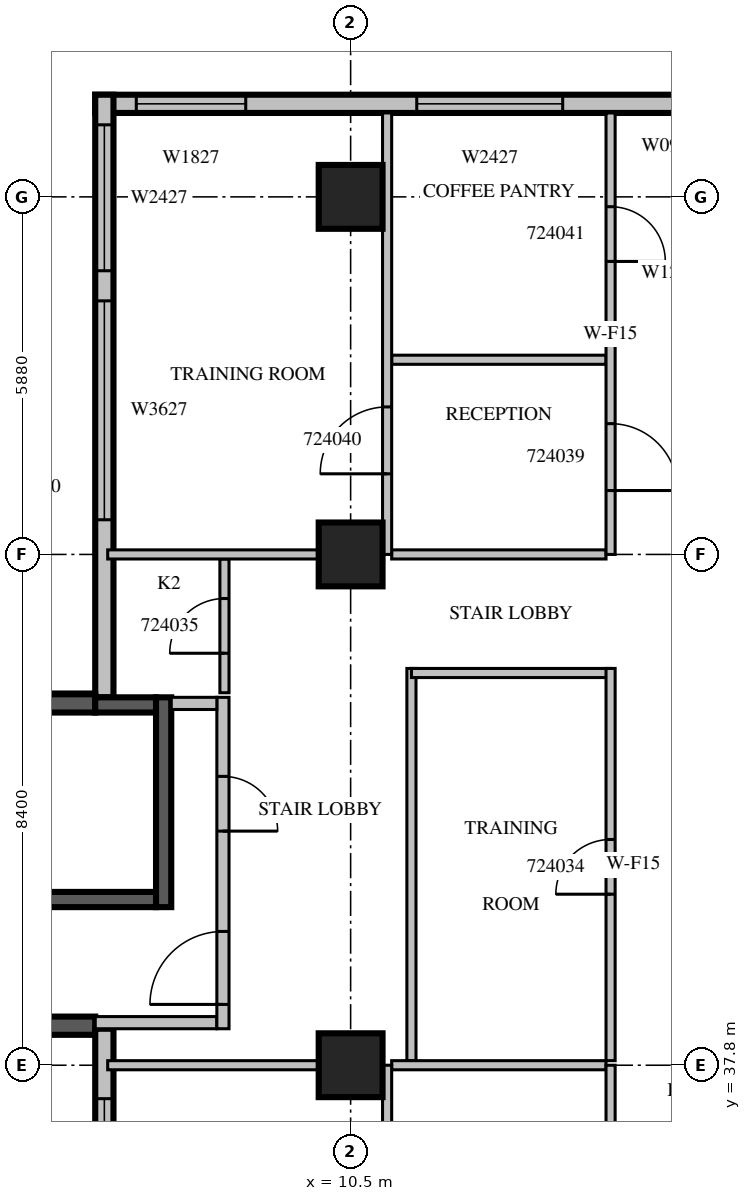
"""IFC4 building model, lengths in metres.
Left out: names, types, materials, properties, quantities, classifications, styles, units other than length and angle.
Written with IfcOpenShell. Run it as: python <this file> out.ifc"""

import sys

from ifc_helpers import new_model, si_unit, direction, frame, frame_2d, origin, origin_2d, place, context, subcontext, project, spatial, rectangle, extrude, source, transform, mapped, element, fill, save


model = new_model("IFC4")
c1 = context("Model", 3, precision=1e-05, world=origin(), true_north=direction((0.0, 1.0)))
c2 = subcontext(c1, "Body", "Model", "MODEL_VIEW")
j1 = project(units=[si_unit("LENGTHUNIT", "METRE"), si_unit("PLANEANGLEUNIT", "RADIAN")], contexts=[c1])
p1 = place(None, origin())
s1 = spatial("IfcSite", under=j1, at=p1, CompositionType="ELEMENT")
p2 = place(p1, origin())
s2 = spatial("IfcBuilding", under=s1, at=p2, CompositionType="ELEMENT")
p3 = place(p2, frame((0.0, 0.0, 111.9)))
s3 = spatial("IfcBuildingStorey", under=s2, at=p3, CompositionType="ELEMENT", Elevation=111.9)
m1 = source(origin(), c2, "Body", "SweptSolid", [
    extrude(rectangle(XDim=1.05, YDim=1.05, at=origin_2d()), origin(), (0.0, 0.0, 1.0), 4.2),
])
for number, where, z_axis, x_axis in (
    (1, (10.5, 37.8, 0.0), (0.0, 0.0, 1.0), (1.0, 0.0, 0.0)),
    (2, (10.5, 46.2, 0.0), (0.0, 0.0, 1.0), (1.0, 0.0, 0.0)),
    (3, (10.5, 52.08, 0.0), (0.0, 0.0, 1.0), (1.0, 0.0, 0.0)),
):
    element("IfcColumn", number, at=place(p3, frame(where, z_axis=z_axis, x_axis=x_axis)), inside=s3, PredefinedType="COLUMN", context=c2, shape_type="MappedRepresentation", body=[
        mapped(m1, transform((0.0, 0.0, 0.0), scale=1.0)),
    ])
m2 = source(origin(), c2, "Body", "SweptSolid", [
    extrude(rectangle(XDim=10.5, YDim=0.3, at=frame_2d((5.25, 0.0))), origin(), (0.0, 0.0, 1.0), 3.8),
])
p4 = place(p3, frame((16.8, 53.61, 0.0), z_axis=(0.0, 0.0, 1.0), x_axis=(-1.0, 0.0, 0.0)))
e4 = element("IfcWall", 4, at=p4, inside=s3, PredefinedType="STANDARD", context=c2, shape_type="MappedRepresentation", body=[
    mapped(m2, transform((0.0, 0.0, 0.0), scale=1.0)),
])
m3 = source(origin(), c2, "Body", "SweptSolid", [
    extrude(rectangle(XDim=1.8, YDim=2.7, at=frame_2d((0.9, 1.35))), frame((0.0, 0.16, 0.0), z_axis=(0.0, -1.0, 0.0), x_axis=(1.0, 0.0, 0.0)), (0.0, 0.0, 1.0), 0.32),
])
p5 = place(p4, frame((8.025, 0.0, 0.6)))
e5 = element("IfcOpeningElement", 5, at=p5, cuts=e4, PredefinedType="OPENING", context=c2, shape_type="MappedRepresentation", body=[
    mapped(m3, transform((0.0, 0.0, 0.0), scale=1.0)),
])
m4 = source(origin(), c2, "Body", "SweptSolid", [
    extrude(rectangle(XDim=2.4, YDim=2.7, at=frame_2d((1.2, 1.35))), frame((0.0, 0.16, 0.0), z_axis=(0.0, -1.0, 0.0), x_axis=(1.0, 0.0, 0.0)), (0.0, 0.0, 1.0), 0.32),
])
p6 = place(p4, frame((2.812, 0.0, 0.6)))
e6 = element("IfcOpeningElement", 6, at=p6, cuts=e4, PredefinedType="OPENING", context=c2, shape_type="MappedRepresentation", body=[
    mapped(m4, transform((0.0, 0.0, 0.0), scale=1.0)),
])
m5 = source(origin(), c2, "Body", "SweptSolid", [
    extrude(rectangle(XDim=9.91, YDim=0.3, at=frame_2d((4.955, 0.0))), origin(), (0.0, 0.0, 1.0), 3.8),
])
p7 = place(p3, frame((6.45, 53.76, 0.0), z_axis=(0.0, 0.0, 1.0), x_axis=(0.0, -1.0, 0.0)))
e7 = element("IfcWall", 7, at=p7, inside=s3, PredefinedType="STANDARD", context=c2, shape_type="MappedRepresentation", body=[
    mapped(m5, transform((0.0, 0.0, 0.0), scale=1.0)),
])
m6 = source(origin(), c2, "Body", "SweptSolid", [
    extrude(rectangle(XDim=3.6, YDim=2.7, at=frame_2d((1.8, 1.35))), frame((0.0, 0.16, 0.0), z_axis=(0.0, -1.0, 0.0), x_axis=(1.0, 0.0, 0.0)), (0.0, 0.0, 1.0), 0.32),
])
p8 = place(p7, frame((3.39, 0.0, 0.6)))
e8 = element("IfcOpeningElement", 8, at=p8, cuts=e7, PredefinedType="OPENING", context=c2, shape_type="MappedRepresentation", body=[
    mapped(m6, transform((0.0, 0.0, 0.0), scale=1.0)),
])
p9 = place(p7, frame((0.495, 0.0, 0.6)))
e9 = element("IfcOpeningElement", 9, at=p9, cuts=e7, PredefinedType="OPENING", context=c2, shape_type="MappedRepresentation", body=[
    mapped(m4, transform((0.0, 0.0, 0.0), scale=1.0)),
])
m7 = source(origin(), c2, "Body", "SweptSolid", [
    extrude(rectangle(XDim=6.1, YDim=0.3, at=frame_2d((3.05, 0.0))), origin(), (0.0, 0.0, 1.0), 3.8),
])
for number, where, z_axis, x_axis in (
    (10, (6.3, 43.75, 0.0), (0.0, 0.0, 1.0), (-1.0, 0.0, 0.0)),
    (11, (0.2, 38.45, 0.0), (0.0, 0.0, 1.0), (1.0, 0.0, 0.0)),
):
    element("IfcWall", number, at=place(p3, frame(where, z_axis=z_axis, x_axis=x_axis)), inside=s3, PredefinedType="SOLIDWALL", context=c2, shape_type="MappedRepresentation", body=[
        mapped(m7, transform((0.0, 0.0, 0.0), scale=1.0)),
    ])
m8 = source(origin(), c2, "Body", "SweptSolid", [
    extrude(rectangle(XDim=16.4, YDim=0.3, at=frame_2d((8.2, 0.0))), origin(), (0.0, 0.0, 1.0), 3.8),
])
p10 = place(p3, frame((6.45, 38.4, 0.0), z_axis=(0.0, 0.0, 1.0), x_axis=(0.0, -1.0, 0.0)))
e12 = element("IfcWall", 12, at=p10, inside=s3, PredefinedType="STANDARD", context=c2, shape_type="MappedRepresentation", body=[
    mapped(m8, transform((0.0, 0.0, 0.0), scale=1.0)),
])
p11 = place(p10, frame((1.15, 0.0, 0.6)))
e13 = element("IfcOpeningElement", 13, at=p11, cuts=e12, PredefinedType="OPENING", context=c2, shape_type="MappedRepresentation", body=[
    mapped(m3, transform((0.0, 0.0, 0.0), scale=1.0)),
])
p12 = place(p10, frame((9.438, 0.0, 0.6)))
e14 = element("IfcOpeningElement", 14, at=p12, cuts=e12, PredefinedType="OPENING", context=c2, shape_type="MappedRepresentation", body=[
    mapped(m3, transform((0.0, 0.0, 0.0), scale=1.0)),
])
p13 = place(p10, frame((13.537, 0.0, 0.6)))
e15 = element("IfcOpeningElement", 15, at=p13, cuts=e12, PredefinedType="OPENING", context=c2, shape_type="MappedRepresentation", body=[
    mapped(m3, transform((0.0, 0.0, 0.0), scale=1.0)),
])
m9 = source(origin(), c2, "Body", "SweptSolid", [
    extrude(rectangle(XDim=1.0, YDim=2.1, at=frame_2d((0.5, 1.05))), frame((0.0, 0.16, 0.0), z_axis=(0.0, -1.0, 0.0), x_axis=(1.0, 0.0, 0.0)), (0.0, 0.0, 1.0), 0.32),
])
p14 = place(p10, frame((5.908, 0.0, 0.0)))
e16 = element("IfcOpeningElement", 16, at=p14, cuts=e12, PredefinedType="OPENING", context=c2, shape_type="MappedRepresentation", body=[
    mapped(m9, transform((0.0, 0.0, 0.0), scale=1.0)),
])
m10 = source(origin(), c2, "Body", "SweptSolid", [
    extrude(rectangle(XDim=7.0, YDim=0.25, at=frame_2d((3.5, 0.0))), origin(), (0.0, 0.0, 1.0), 3.8),
])
p15 = place(p3, frame((0.3, 40.525, 0.0), z_axis=(0.0, 0.0, 1.0), x_axis=(1.0, 0.0, 0.0)))
e17 = element("IfcWall", 17, at=p15, inside=s3, PredefinedType="SOLIDWALL", context=c2, shape_type="MappedRepresentation", body=[
    mapped(m10, transform((0.0, 0.0, 0.0), scale=1.0)),
])
m11 = source(origin(), c2, "Body", "SweptSolid", [
    extrude(rectangle(XDim=1.1, YDim=2.1, at=frame_2d((0.55, 1.05))), frame((0.0, 0.135, 0.0), z_axis=(0.0, -1.0, 0.0), x_axis=(1.0, 0.0, 0.0)), (0.0, 0.0, 1.0), 0.27),
])
p16 = place(p15, frame((0.55, 0.0, 0.0)))
e18 = element("IfcOpeningElement", 18, at=p16, cuts=e17, PredefinedType="OPENING", context=c2, shape_type="MappedRepresentation", body=[
    mapped(m11, transform((0.0, 0.0, 0.0), scale=1.0)),
])
m12 = source(origin(), c2, "Body", "SweptSolid", [
    extrude(rectangle(XDim=1.0, YDim=0.25, at=frame_2d((0.5, 0.0))), origin(), (0.0, 0.0, 1.0), 3.8),
])
p17 = place(p3, frame((6.3, 43.725, 0.0), z_axis=(0.0, 0.0, 1.0), x_axis=(1.0, 0.0, 0.0)))
e19 = element("IfcWall", 19, at=p17, inside=s3, PredefinedType="SOLIDWALL", context=c2, shape_type="MappedRepresentation", body=[
    mapped(m12, transform((0.0, 0.0, 0.0), scale=1.0)),
])
m13 = source(origin(), c2, "Body", "SweptSolid", [
    extrude(rectangle(XDim=3.45, YDim=0.25, at=frame_2d((1.725, 0.0))), origin(), (0.0, 0.0, 1.0), 3.8),
])
p18 = place(p3, frame((7.425, 40.4, 0.0), z_axis=(0.0, 0.0, 1.0), x_axis=(0.0, 1.0, 0.0)))
e20 = element("IfcWall", 20, at=p18, inside=s3, PredefinedType="SOLIDWALL", context=c2, shape_type="MappedRepresentation", body=[
    mapped(m13, transform((0.0, 0.0, 0.0), scale=1.0)),
])
m14 = source(origin(), c2, "Body", "SweptSolid", [
    extrude(rectangle(XDim=2.0, YDim=0.2, at=frame_2d((1.0, 0.0))), origin(), (0.0, 0.0, 1.0), 3.8),
])
p19 = place(p3, frame((6.3, 38.5, 0.0), z_axis=(0.0, 0.0, 1.0), x_axis=(1.0, 0.0, 0.0)))
e21 = element("IfcWall", 21, at=p19, inside=s3, PredefinedType="PARTITIONING", context=c2, shape_type="MappedRepresentation", body=[
    mapped(m14, transform((0.0, 0.0, 0.0), scale=1.0)),
])
m15 = source(origin(), c2, "Body", "SweptSolid", [
    extrude(rectangle(XDim=5.45, YDim=0.2, at=frame_2d((2.725, 0.0))), origin(), (0.0, 0.0, 1.0), 3.8),
])
p20 = place(p3, frame((8.4, 38.4, 0.0), z_axis=(0.0, 0.0, 1.0), x_axis=(0.0, 1.0, 0.0)))
e22 = element("IfcWall", 22, at=p20, inside=s3, PredefinedType="PARTITIONING", context=c2, shape_type="MappedRepresentation", body=[
    mapped(m15, transform((0.0, 0.0, 0.0), scale=1.0)),
])
m16 = source(origin(), c2, "Body", "SweptSolid", [
    extrude(rectangle(XDim=1.2, YDim=2.1, at=frame_2d((0.6, 1.05))), frame((0.0, 0.11, 0.0), z_axis=(0.0, -1.0, 0.0), x_axis=(1.0, 0.0, 0.0)), (0.0, 0.0, 1.0), 0.22),
])
p21 = place(p20, frame((0.4, 0.0, 0.0)))
e23 = element("IfcOpeningElement", 23, at=p21, cuts=e22, PredefinedType="OPENING", context=c2, shape_type="MappedRepresentation", body=[
    mapped(m16, transform((0.0, 0.0, 0.0), scale=1.0)),
])
m17 = source(origin(), c2, "Body", "SweptSolid", [
    extrude(rectangle(XDim=0.9, YDim=2.1, at=frame_2d((0.45, 1.05))), frame((0.0, 0.11, 0.0), z_axis=(0.0, -1.0, 0.0), x_axis=(1.0, 0.0, 0.0)), (0.0, 0.0, 1.0), 0.22),
])
p22 = place(p20, frame((3.25, 0.0, 0.0)))
e24 = element("IfcOpeningElement", 24, at=p22, cuts=e22, PredefinedType="OPENING", context=c2, shape_type="MappedRepresentation", body=[
    mapped(m17, transform((0.0, 0.0, 0.0), scale=1.0)),
])
m18 = source(origin(), c2, "Body", "SweptSolid", [
    extrude(rectangle(XDim=0.75, YDim=0.2, at=frame_2d((0.375, 0.0))), origin(), (0.0, 0.0, 1.0), 3.8),
])
p23 = place(p3, frame((7.55, 43.75, 0.0), z_axis=(0.0, 0.0, 1.0), x_axis=(1.0, 0.0, 0.0)))
e25 = element("IfcWall", 25, at=p23, inside=s3, PredefinedType="PARTITIONING", context=c2, shape_type="MappedRepresentation", body=[
    mapped(m18, transform((0.0, 0.0, 0.0), scale=1.0)),
])
m19 = source(origin(), c2, "Body", "SweptSolid", [
    extrude(rectangle(XDim=6.45, YDim=0.15, at=frame_2d((3.225, 0.0))), origin(), (0.0, 0.0, 1.0), 3.8),
])
p24 = place(p3, frame((11.5, 44.325, 0.0), z_axis=(0.0, 0.0, 1.0), x_axis=(0.0, -1.0, 0.0)))
e26 = element("IfcWall", 26, at=p24, inside=s3, PredefinedType="PARTITIONING", context=c2, shape_type="MappedRepresentation", body=[
    mapped(m19, transform((0.0, 0.0, 0.0), scale=1.0)),
])
m20 = source(origin(), c2, "Body", "SweptSolid", [
    extrude(rectangle(XDim=3.275, YDim=0.15, at=frame_2d((1.637, 0.0))), origin(), (0.0, 0.0, 1.0), 3.8),
])
p25 = place(p3, frame((14.775, 44.25, 0.0), z_axis=(0.0, 0.0, 1.0), x_axis=(-1.0, 0.0, 0.0)))
e27 = element("IfcWall", 27, at=p25, inside=s3, PredefinedType="PARTITIONING", context=c2, shape_type="MappedRepresentation", body=[
    mapped(m20, transform((0.0, 0.0, 0.0), scale=1.0)),
])
p26 = place(p3, frame((14.775, 37.875, 0.0), z_axis=(0.0, 0.0, 1.0), x_axis=(0.0, 1.0, 0.0)))
e28 = element("IfcWall", 28, at=p26, inside=s3, PredefinedType="PARTITIONING", context=c2, shape_type="MappedRepresentation", body=[
    mapped(m19, transform((0.0, 0.0, 0.0), scale=1.0)),
])
m21 = source(origin(), c2, "Body", "SweptSolid", [
    extrude(rectangle(XDim=0.9, YDim=2.1, at=frame_2d((0.45, 1.05))), frame((0.0, 0.085, 0.0), z_axis=(0.0, -1.0, 0.0), x_axis=(1.0, 0.0, 0.0)), (0.0, 0.0, 1.0), 0.17),
])
p27 = place(p26, frame((2.737, 0.0, 0.0)))
e29 = element("IfcOpeningElement", 29, at=p27, cuts=e28, PredefinedType="OPENING", context=c2, shape_type="MappedRepresentation", body=[
    mapped(m21, transform((0.0, 0.0, 0.0), scale=1.0)),
])
m22 = source(origin(), c2, "Body", "SweptSolid", [
    extrude(rectangle(XDim=2.2, YDim=0.15, at=frame_2d((1.1, 0.0))), origin(), (0.0, 0.0, 1.0), 3.8),
])
p28 = place(p3, frame((8.425, 43.925, 0.0), z_axis=(0.0, 0.0, 1.0), x_axis=(0.0, 1.0, 0.0)))
e30 = element("IfcWall", 30, at=p28, inside=s3, PredefinedType="PARTITIONING", context=c2, shape_type="MappedRepresentation", body=[
    mapped(m22, transform((0.0, 0.0, 0.0), scale=1.0)),
])
p29 = place(p28, frame((0.65, 0.0, 0.0)))
e31 = element("IfcOpeningElement", 31, at=p29, cuts=e30, PredefinedType="OPENING", context=c2, shape_type="MappedRepresentation", body=[
    mapped(m21, transform((0.0, 0.0, 0.0), scale=1.0)),
])
m23 = source(origin(), c2, "Body", "SweptSolid", [
    extrude(rectangle(XDim=3.471, YDim=0.15, at=frame_2d((1.736, 0.0))), origin(), (0.0, 0.0, 1.0), 3.8),
])
p30 = place(p3, frame((9.976, 37.8, 0.0), z_axis=(0.0, 0.0, 1.0), x_axis=(-1.0, 0.0, 0.0)))
e32 = element("IfcWall", 32, at=p30, inside=s3, PredefinedType="PARTITIONING", context=c2, shape_type="MappedRepresentation", body=[
    mapped(m23, transform((0.0, 0.0, 0.0), scale=1.0)),
])
m24 = source(origin(), c2, "Body", "SweptSolid", [
    extrude(rectangle(XDim=3.525, YDim=0.15, at=frame_2d((1.762, 0.0))), origin(), (0.0, 0.0, 1.0), 3.8),
])
p31 = place(p3, frame((14.7, 37.8, 0.0), z_axis=(0.0, 0.0, 1.0), x_axis=(-1.0, 0.0, 0.0)))
e33 = element("IfcWall", 33, at=p31, inside=s3, PredefinedType="PARTITIONING", context=c2, shape_type="MappedRepresentation", body=[
    mapped(m24, transform((0.0, 0.0, 0.0), scale=1.0)),
])
m25 = source(origin(), c2, "Body", "SweptSolid", [
    extrude(rectangle(XDim=8.4, YDim=0.15, at=frame_2d((4.2, 0.0))), origin(), (0.0, 0.0, 1.0), 3.8),
])
p32 = place(p3, frame((11.1, 29.4, 0.0), z_axis=(0.0, 0.0, 1.0), x_axis=(0.0, 1.0, 0.0)))
e34 = element("IfcWall", 34, at=p32, inside=s3, PredefinedType="PARTITIONING", context=c2, shape_type="MappedRepresentation", body=[
    mapped(m25, transform((0.0, 0.0, 0.0), scale=1.0)),
])
p33 = place(p32, frame((1.925, 0.0, 0.0)))
e35 = element("IfcOpeningElement", 35, at=p33, cuts=e34, PredefinedType="OPENING", context=c2, shape_type="MappedRepresentation", body=[
    mapped(m21, transform((0.0, 0.0, 0.0), scale=1.0)),
])
p34 = place(p32, frame((5.625, 0.0, 0.0)))
e36 = element("IfcOpeningElement", 36, at=p34, cuts=e34, PredefinedType="OPENING", context=c2, shape_type="MappedRepresentation", body=[
    mapped(m21, transform((0.0, 0.0, 0.0), scale=1.0)),
])
p35 = place(p3, frame((14.7, 49.401, 0.0), z_axis=(0.0, 0.0, 1.0), x_axis=(-1.0, 0.0, 0.0)))
e37 = element("IfcWall", 37, at=p35, inside=s3, PredefinedType="PARTITIONING", context=c2, shape_type="MappedRepresentation", body=[
    mapped(m24, transform((0.0, 0.0, 0.0), scale=1.0)),
])
p36 = place(p3, frame((9.976, 46.2, 0.0), z_axis=(0.0, 0.0, 1.0), x_axis=(-1.0, 0.0, 0.0)))
e38 = element("IfcWall", 38, at=p36, inside=s3, PredefinedType="PARTITIONING", context=c2, shape_type="MappedRepresentation", body=[
    mapped(m23, transform((0.0, 0.0, 0.0), scale=1.0)),
])
p37 = place(p3, frame((14.7, 46.2, 0.0), z_axis=(0.0, 0.0, 1.0), x_axis=(-1.0, 0.0, 0.0)))
e39 = element("IfcWall", 39, at=p37, inside=s3, PredefinedType="PARTITIONING", context=c2, shape_type="MappedRepresentation", body=[
    mapped(m24, transform((0.0, 0.0, 0.0), scale=1.0)),
])
m26 = source(origin(), c2, "Body", "SweptSolid", [
    extrude(rectangle(XDim=7.26, YDim=0.15, at=frame_2d((3.63, 0.0))), origin(), (0.0, 0.0, 1.0), 3.8),
])
p38 = place(p3, frame((11.1, 46.2, 0.0), z_axis=(0.0, 0.0, 1.0), x_axis=(0.0, 1.0, 0.0)))
e40 = element("IfcWall", 40, at=p38, inside=s3, PredefinedType="PARTITIONING", context=c2, shape_type="MappedRepresentation", body=[
    mapped(m26, transform((0.0, 0.0, 0.0), scale=1.0)),
])
m27 = source(origin(), c2, "Body", "SweptSolid", [
    extrude(rectangle(XDim=1.1, YDim=2.1, at=frame_2d((0.55, 1.05))), frame((0.0, 0.085, 0.0), z_axis=(0.0, -1.0, 0.0), x_axis=(1.0, 0.0, 0.0)), (0.0, 0.0, 1.0), 0.17),
])
p39 = place(p38, frame((1.326, 0.0, 0.0)))
e41 = element("IfcOpeningElement", 41, at=p39, cuts=e40, PredefinedType="OPENING", context=c2, shape_type="MappedRepresentation", body=[
    mapped(m27, transform((0.0, 0.0, 0.0), scale=1.0)),
])
p40 = place(p3, frame((14.775, 29.4, 0.0), z_axis=(0.0, 0.0, 1.0), x_axis=(0.0, 1.0, 0.0)))
e42 = element("IfcWall", 42, at=p40, inside=s3, PredefinedType="PARTITIONING", context=c2, shape_type="MappedRepresentation", body=[
    mapped(m25, transform((0.0, 0.0, 0.0), scale=1.0)),
])
m28 = source(origin(), c2, "Body", "SweptSolid", [
    extrude(rectangle(XDim=1.2, YDim=2.1, at=frame_2d((0.6, 1.05))), frame((0.0, 0.085, 0.0), z_axis=(0.0, -1.0, 0.0), x_axis=(1.0, 0.0, 0.0)), (0.0, 0.0, 1.0), 0.17),
])
p41 = place(p40, frame((3.6, 0.0, 0.0)))
e43 = element("IfcOpeningElement", 43, at=p41, cuts=e42, PredefinedType="OPENING", context=c2, shape_type="MappedRepresentation", body=[
    mapped(m28, transform((0.0, 0.0, 0.0), scale=1.0)),
])
p42 = place(p3, frame((14.775, 46.2, 0.0), z_axis=(0.0, 0.0, 1.0), x_axis=(0.0, 1.0, 0.0)))
e44 = element("IfcWall", 44, at=p42, inside=s3, PredefinedType="PARTITIONING", context=c2, shape_type="MappedRepresentation", body=[
    mapped(m26, transform((0.0, 0.0, 0.0), scale=1.0)),
])
p43 = place(p42, frame((1.051, 0.0, 0.0)))
e45 = element("IfcOpeningElement", 45, at=p43, cuts=e44, PredefinedType="OPENING", context=c2, shape_type="MappedRepresentation", body=[
    mapped(m27, transform((0.0, 0.0, 0.0), scale=1.0)),
])
p44 = place(p42, frame((4.818, 0.0, 0.0)))
e46 = element("IfcOpeningElement", 46, at=p44, cuts=e44, PredefinedType="OPENING", context=c2, shape_type="MappedRepresentation", body=[
    mapped(m21, transform((0.0, 0.0, 0.0), scale=1.0)),
])
m29 = source(origin(), c2, "Body", "SweptSolid", [
    extrude(rectangle(XDim=1.8, YDim=2.7, at=frame_2d((0.9, 1.35))), frame((0.0, 0.03, 0.0), z_axis=(0.0, -1.0, 0.0), x_axis=(1.0, 0.0, 0.0)), (0.0, 0.0, 1.0), 0.06),
])
p45 = place(p5, origin())
e47 = element("IfcWindow", 47, at=p45, inside=s3, PartitioningType="SINGLE_PANEL", PredefinedType="WINDOW", context=c2, shape_type="MappedRepresentation", body=[
    mapped(m29, transform((0.0, 0.0, 0.0), scale=1.0)),
])
fill(e5, e47)
m30 = source(origin(), c2, "Body", "SweptSolid", [
    extrude(rectangle(XDim=2.4, YDim=2.7, at=frame_2d((1.2, 1.35))), frame((0.0, 0.03, 0.0), z_axis=(0.0, -1.0, 0.0), x_axis=(1.0, 0.0, 0.0)), (0.0, 0.0, 1.0), 0.06),
])
p46 = place(p6, origin())
e48 = element("IfcWindow", 48, at=p46, inside=s3, PartitioningType="SINGLE_PANEL", PredefinedType="WINDOW", context=c2, shape_type="MappedRepresentation", body=[
    mapped(m30, transform((0.0, 0.0, 0.0), scale=1.0)),
])
fill(e6, e48)
m31 = source(origin(), c2, "Body", "SweptSolid", [
    extrude(rectangle(XDim=3.6, YDim=2.7, at=frame_2d((1.8, 1.35))), frame((0.0, 0.03, 0.0), z_axis=(0.0, -1.0, 0.0), x_axis=(1.0, 0.0, 0.0)), (0.0, 0.0, 1.0), 0.06),
])
p47 = place(p8, origin())
e49 = element("IfcWindow", 49, at=p47, inside=s3, PartitioningType="SINGLE_PANEL", PredefinedType="WINDOW", context=c2, shape_type="MappedRepresentation", body=[
    mapped(m31, transform((0.0, 0.0, 0.0), scale=1.0)),
])
fill(e8, e49)
p48 = place(p9, origin())
e50 = element("IfcWindow", 50, at=p48, inside=s3, PartitioningType="SINGLE_PANEL", PredefinedType="WINDOW", context=c2, shape_type="MappedRepresentation", body=[
    mapped(m30, transform((0.0, 0.0, 0.0), scale=1.0)),
])
fill(e9, e50)
p49 = place(p11, origin())
e51 = element("IfcWindow", 51, at=p49, inside=s3, PartitioningType="SINGLE_PANEL", PredefinedType="WINDOW", context=c2, shape_type="MappedRepresentation", body=[
    mapped(m29, transform((0.0, 0.0, 0.0), scale=1.0)),
])
fill(e13, e51)
m32 = source(origin(), c2, "Body", "SweptSolid", [
    extrude(rectangle(XDim=1.2, YDim=2.1, at=frame_2d((0.6, 1.05))), frame((0.0, 0.025, 0.0), z_axis=(0.0, -1.0, 0.0), x_axis=(1.0, 0.0, 0.0)), (0.0, 0.0, 1.0), 0.05),
])
p50 = place(p21, origin())
e52 = element("IfcDoor", 52, at=p50, inside=s3, OperationType="SINGLE_SWING_LEFT", PredefinedType="DOOR", context=c2, shape_type="MappedRepresentation", body=[
    mapped(m32, transform((0.0, 0.0, 0.0), scale=1.0)),
])
fill(e23, e52)
m33 = source(origin(), c2, "Body", "SweptSolid", [
    extrude(rectangle(XDim=0.9, YDim=2.1, at=frame_2d((0.45, 1.05))), frame((0.0, 0.025, 0.0), z_axis=(0.0, -1.0, 0.0), x_axis=(1.0, 0.0, 0.0)), (0.0, 0.0, 1.0), 0.05),
])
p51 = place(p22, origin())
e53 = element("IfcDoor", 53, at=p51, inside=s3, OperationType="SINGLE_SWING_RIGHT", PredefinedType="DOOR", context=c2, shape_type="MappedRepresentation", body=[
    mapped(m33, transform((0.0, 0.0, 0.0), scale=1.0)),
])
fill(e24, e53)
p52 = place(p27, origin())
e54 = element("IfcDoor", 54, at=p52, inside=s3, OperationType="SINGLE_SWING_LEFT", PredefinedType="DOOR", context=c2, shape_type="MappedRepresentation", body=[
    mapped(m33, transform((0.0, 0.0, 0.0), scale=1.0)),
])
fill(e29, e54)
p53 = place(p29, origin())
e55 = element("IfcDoor", 55, at=p53, inside=s3, OperationType="SINGLE_SWING_LEFT", PredefinedType="DOOR", context=c2, shape_type="MappedRepresentation", body=[
    mapped(m33, transform((0.0, 0.0, 0.0), scale=1.0)),
])
fill(e31, e55)
m34 = source(origin(), c2, "Body", "SweptSolid", [
    extrude(rectangle(XDim=1.1, YDim=2.1, at=frame_2d((0.55, 1.05))), frame((0.0, 0.025, 0.0), z_axis=(0.0, -1.0, 0.0), x_axis=(1.0, 0.0, 0.0)), (0.0, 0.0, 1.0), 0.05),
])
p54 = place(p43, origin())
e56 = element("IfcDoor", 56, at=p54, inside=s3, OperationType="SINGLE_SWING_RIGHT", PredefinedType="DOOR", context=c2, shape_type="MappedRepresentation", body=[
    mapped(m34, transform((0.0, 0.0, 0.0), scale=1.0)),
])
fill(e45, e56)
p55 = place(p39, origin())
e57 = element("IfcDoor", 57, at=p55, inside=s3, OperationType="SINGLE_SWING_LEFT", PredefinedType="DOOR", context=c2, shape_type="MappedRepresentation", body=[
    mapped(m34, transform((0.0, 0.0, 0.0), scale=1.0)),
])
fill(e41, e57)
p56 = place(p44, origin())
e58 = element("IfcDoor", 58, at=p56, inside=s3, OperationType="SINGLE_SWING_RIGHT", PredefinedType="DOOR", context=c2, shape_type="MappedRepresentation", body=[
    mapped(m33, transform((0.0, 0.0, 0.0), scale=1.0)),
])
fill(e46, e58)
save(model, sys.argv[1])
